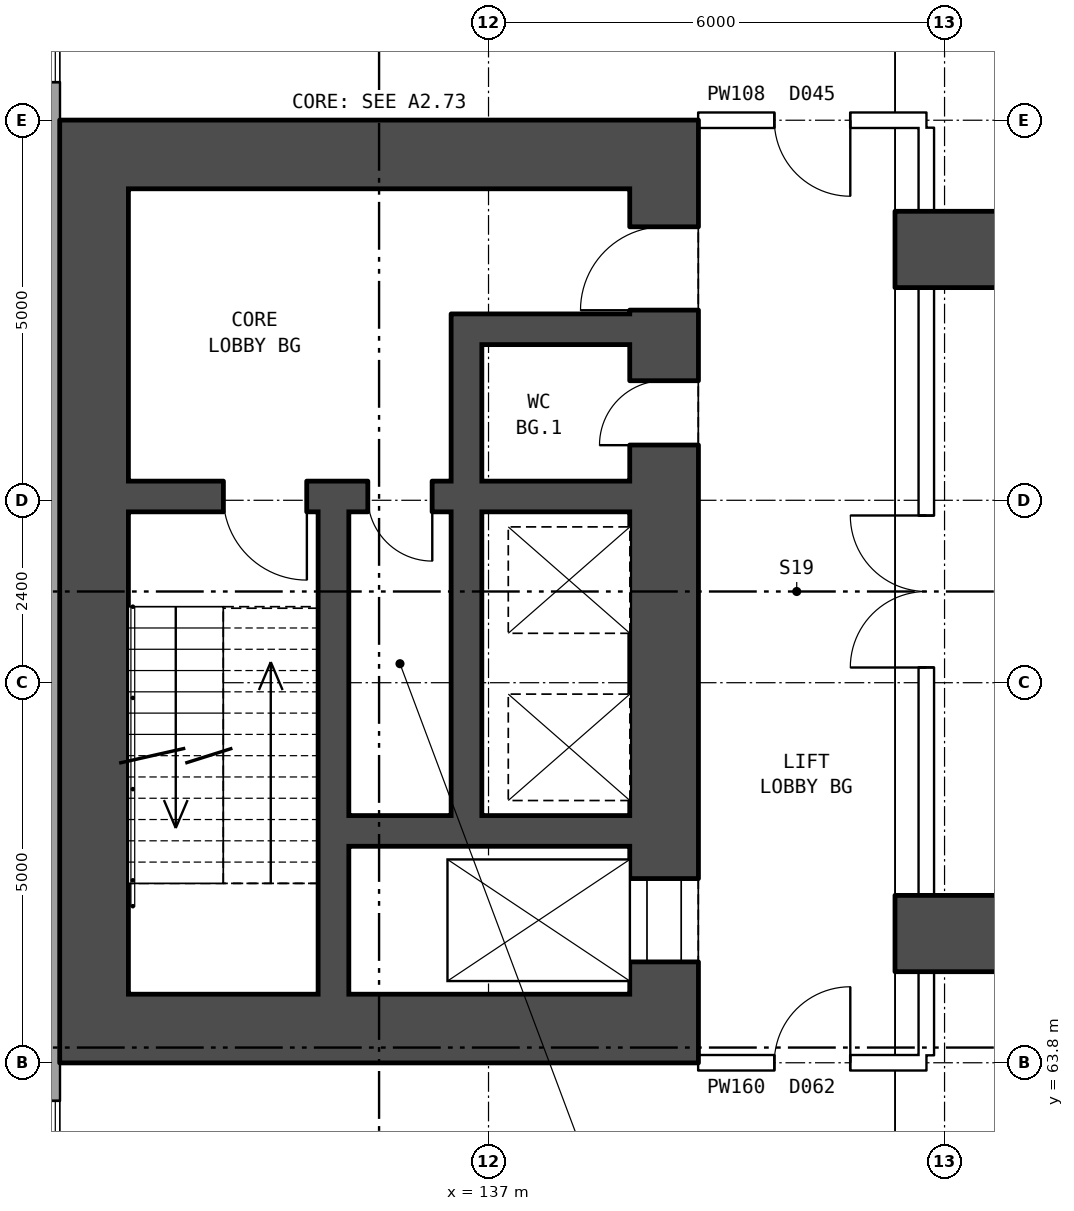
"""IFC4 building model, lengths in metres.
Left out: names, types, materials, properties, quantities, classifications, styles, units other than length and angle.
Written with IfcOpenShell. Run it as: python <this file> out.ifc"""

import sys

from ifc_helpers import new_model, si_unit, direction, frame, frame_2d, origin, place, context, subcontext, project, spatial, rectangle, extrude, element, fill, save


model = new_model("IFC4")
c1 = context("Model", 3, precision=1e-05, world=origin(), true_north=direction((0.0, 1.0)))
c2 = subcontext(c1, "Body", "Model", "MODEL_VIEW")
j1 = project(units=[si_unit("LENGTHUNIT", "METRE"), si_unit("PLANEANGLEUNIT", "RADIAN")], contexts=[c1])
p1 = place(None, origin())
s1 = spatial("IfcSite", under=j1, at=p1, CompositionType="ELEMENT")
p2 = place(p1, origin())
s2 = spatial("IfcBuilding", under=s1, at=p2, CompositionType="ELEMENT")
p3 = place(p2, frame((0.0, 0.0, 14.7)))
s3 = spatial("IfcBuildingStorey", under=s2, at=p3, CompositionType="ELEMENT", Elevation=14.7)
for number, where, z_axis, x_axis in (
    (1, (142.35, 65.5, 0.0), (0.0, 0.0, 1.0), (1.0, 0.0, 0.0)),
    (2, (142.35, 74.5, 0.0), (0.0, 0.0, 1.0), (1.0, 0.0, 0.0)),
):
    element("IfcWall", number, at=place(p3, frame(where, z_axis=z_axis, x_axis=x_axis)), inside=s3, PredefinedType="SHEAR", context=c2, shape_type="SweptSolid", body=[
        extrude(rectangle(XDim=15.3, YDim=1.0, at=frame_2d((7.65, 0.0))), origin(), (0.0, 0.0, 1.0), 4.0),
    ])
p4 = place(p3, frame((131.18, 82.925, 0.0), z_axis=(0.0, 0.0, 1.0), x_axis=(0.0, -1.0, 0.0)))
e3 = element("IfcWall", 3, at=p4, inside=s3, PredefinedType="STANDARD", context=c2, shape_type="SweptSolid", body=[
    extrude(rectangle(XDim=25.851, YDim=0.36, at=frame_2d((12.925, 0.0))), origin(), (0.0, 0.0, 1.0), 4.0),
])
p5 = place(p4, frame((1.625, 0.0, 0.8)))
e4 = element("IfcOpeningElement", 4, at=p5, cuts=e3, PredefinedType="OPENING", context=c2, shape_type="SweptSolid", body=[
    extrude(rectangle(XDim=1.6, YDim=1.8, at=frame_2d((0.8, 0.9))), frame((0.0, 0.19, 0.0), z_axis=(0.0, -1.0, 0.0), x_axis=(1.0, 0.0, 0.0)), (0.0, 0.0, 1.0), 0.38),
])
p6 = place(p4, frame((4.625, 0.0, 0.8)))
e5 = element("IfcOpeningElement", 5, at=p6, cuts=e3, PredefinedType="OPENING", context=c2, shape_type="SweptSolid", body=[
    extrude(rectangle(XDim=1.6, YDim=1.8, at=frame_2d((0.8, 0.9))), frame((0.0, 0.19, 0.0), z_axis=(0.0, -1.0, 0.0), x_axis=(1.0, 0.0, 0.0)), (0.0, 0.0, 1.0), 0.38),
])
p7 = place(p4, frame((19.625, 0.0, 0.8)))
e6 = element("IfcOpeningElement", 6, at=p7, cuts=e3, PredefinedType="OPENING", context=c2, shape_type="SweptSolid", body=[
    extrude(rectangle(XDim=1.6, YDim=1.8, at=frame_2d((0.8, 0.9))), frame((0.0, 0.19, 0.0), z_axis=(0.0, -1.0, 0.0), x_axis=(1.0, 0.0, 0.0)), (0.0, 0.0, 1.0), 0.38),
])
p8 = place(p4, frame((22.625, 0.0, 0.8)))
e7 = element("IfcOpeningElement", 7, at=p8, cuts=e3, PredefinedType="OPENING", context=c2, shape_type="SweptSolid", body=[
    extrude(rectangle(XDim=1.6, YDim=1.8, at=frame_2d((0.8, 0.9))), frame((0.0, 0.19, 0.0), z_axis=(0.0, -1.0, 0.0), x_axis=(1.0, 0.0, 0.0)), (0.0, 0.0, 1.0), 0.38),
])
p9 = place(p3, frame((139.31, 64.7, 0.0), z_axis=(0.0, 0.0, 1.0), x_axis=(0.0, 1.0, 0.0)))
e8 = element("IfcWall", 8, at=p9, inside=s3, PredefinedType="SHEAR", context=c2, shape_type="SweptSolid", body=[
    extrude(rectangle(XDim=10.6, YDim=0.9, at=frame_2d((5.3, 0.0))), origin(), (0.0, 0.0, 1.0), 4.0),
])
p10 = place(p9, frame((0.425, 0.0, 0.0)))
e9 = element("IfcOpeningElement", 9, at=p10, cuts=e8, PredefinedType="OPENING", context=c2, shape_type="SweptSolid", body=[
    extrude(rectangle(XDim=1.1, YDim=2.1, at=frame_2d((0.55, 1.05))), frame((0.0, 0.46, 0.0), z_axis=(0.0, -1.0, 0.0), x_axis=(1.0, 0.0, 0.0)), (0.0, 0.0, 1.0), 0.92),
])
p11 = place(p9, frame((9.0, 0.0, 0.0)))
e10 = element("IfcOpeningElement", 10, at=p11, cuts=e8, PredefinedType="OPENING", context=c2, shape_type="SweptSolid", body=[
    extrude(rectangle(XDim=1.1, YDim=2.1, at=frame_2d((0.55, 1.05))), frame((0.0, 0.46, 0.0), z_axis=(0.0, -1.0, 0.0), x_axis=(1.0, 0.0, 0.0)), (0.0, 0.0, 1.0), 0.92),
])
p12 = place(p9, frame((7.225, 0.0, 0.0)))
e11 = element("IfcOpeningElement", 11, at=p12, cuts=e8, PredefinedType="OPENING", context=c2, shape_type="SweptSolid", body=[
    extrude(rectangle(XDim=0.85, YDim=2.1, at=frame_2d((0.425, 1.05))), frame((0.0, 0.46, 0.0), z_axis=(0.0, -1.0, 0.0), x_axis=(1.0, 0.0, 0.0)), (0.0, 0.0, 1.0), 0.92),
])
p13 = place(p3, frame((131.81, 64.7, 0.0), z_axis=(0.0, 0.0, 1.0), x_axis=(0.0, 1.0, 0.0)))
e12 = element("IfcWall", 12, at=p13, inside=s3, PredefinedType="SHEAR", context=c2, shape_type="SweptSolid", body=[
    extrude(rectangle(XDim=10.6, YDim=0.9, at=frame_2d((5.3, 0.0))), origin(), (0.0, 0.0, 1.0), 4.0),
])
for number, where, z_axis, x_axis in (
    (13, (139.76, 64.25, 0.0), (0.0, 0.0, 1.0), (-1.0, 0.0, 0.0)),
    (14, (139.76, 75.75, 0.0), (0.0, 0.0, 1.0), (-1.0, 0.0, 0.0)),
):
    element("IfcWall", number, at=place(p3, frame(where, z_axis=z_axis, x_axis=x_axis)), inside=s3, PredefinedType="SHEAR", context=c2, shape_type="SweptSolid", body=[
        extrude(rectangle(XDim=8.4, YDim=0.9, at=frame_2d((4.2, 0.0))), origin(), (0.0, 0.0, 1.0), 4.0),
    ])
p14 = place(p3, frame((138.86, 66.85, 0.0), z_axis=(0.0, 0.0, 1.0), x_axis=(-1.0, 0.0, 0.0)))
e15 = element("IfcWall", 15, at=p14, inside=s3, PredefinedType="SHEAR", context=c2, shape_type="SweptSolid", body=[
    extrude(rectangle(XDim=3.7, YDim=0.4, at=frame_2d((1.85, 0.0))), origin(), (0.0, 0.0, 1.0), 4.0),
])
p15 = place(p3, frame((138.86, 71.25, 0.0), z_axis=(0.0, 0.0, 1.0), x_axis=(-1.0, 0.0, 0.0)))
e16 = element("IfcWall", 16, at=p15, inside=s3, PredefinedType="SHEAR", context=c2, shape_type="SweptSolid", body=[
    extrude(rectangle(XDim=6.6, YDim=0.4, at=frame_2d((3.3, 0.0))), origin(), (0.0, 0.0, 1.0), 4.0),
])
p16 = place(p15, frame((4.25, 0.0, 0.0)))
e17 = element("IfcOpeningElement", 17, at=p16, cuts=e16, PredefinedType="OPENING", context=c2, shape_type="SweptSolid", body=[
    extrude(rectangle(XDim=1.1, YDim=2.1, at=frame_2d((0.55, 1.05))), frame((0.0, 0.21, 0.0), z_axis=(0.0, -1.0, 0.0), x_axis=(1.0, 0.0, 0.0)), (0.0, 0.0, 1.0), 0.42),
])
p17 = place(p15, frame((2.6, 0.0, 0.0)))
e18 = element("IfcOpeningElement", 18, at=p17, cuts=e16, PredefinedType="OPENING", context=c2, shape_type="SweptSolid", body=[
    extrude(rectangle(XDim=0.85, YDim=2.1, at=frame_2d((0.425, 1.05))), frame((0.0, 0.21, 0.0), z_axis=(0.0, -1.0, 0.0), x_axis=(1.0, 0.0, 0.0)), (0.0, 0.0, 1.0), 0.42),
])
p18 = place(p3, frame((138.86, 73.45, 0.0), z_axis=(0.0, 0.0, 1.0), x_axis=(-1.0, 0.0, 0.0)))
e19 = element("IfcWall", 19, at=p18, inside=s3, PredefinedType="SHEAR", context=c2, shape_type="SweptSolid", body=[
    extrude(rectangle(XDim=1.95, YDim=0.4, at=frame_2d((0.975, 0.0))), origin(), (0.0, 0.0, 1.0), 4.0),
])
p19 = place(p3, frame((136.71, 67.05, 0.0), z_axis=(0.0, 0.0, 1.0), x_axis=(0.0, 1.0, 0.0)))
e20 = element("IfcWall", 20, at=p19, inside=s3, PredefinedType="SHEAR", context=c2, shape_type="SweptSolid", body=[
    extrude(rectangle(XDim=4.0, YDim=0.4, at=frame_2d((2.0, 0.0))), origin(), (0.0, 0.0, 1.0), 4.0),
])
p20 = place(p3, frame((136.71, 71.45, 0.0), z_axis=(0.0, 0.0, 1.0), x_axis=(0.0, 1.0, 0.0)))
e21 = element("IfcWall", 21, at=p20, inside=s3, PredefinedType="SHEAR", context=c2, shape_type="SweptSolid", body=[
    extrude(rectangle(XDim=2.2, YDim=0.4, at=frame_2d((1.1, 0.0))), origin(), (0.0, 0.0, 1.0), 4.0),
])
p21 = place(p3, frame((134.96, 64.7, 0.0), z_axis=(0.0, 0.0, 1.0), x_axis=(0.0, 1.0, 0.0)))
e22 = element("IfcWall", 22, at=p21, inside=s3, PredefinedType="SHEAR", context=c2, shape_type="SweptSolid", body=[
    extrude(rectangle(XDim=6.35, YDim=0.4, at=frame_2d((3.175, 0.0))), origin(), (0.0, 0.0, 1.0), 4.0),
])
p22 = place(p3, frame((142.76, 63.9, 0.0), z_axis=(0.0, 0.0, 1.0), x_axis=(0.0, 1.0, 0.0)))
e23 = element("IfcWall", 23, at=p22, inside=s3, PredefinedType="PARTITIONING", context=c2, shape_type="SweptSolid", body=[
    extrude(rectangle(XDim=12.2, YDim=0.2, at=frame_2d((6.1, 0.0))), origin(), (0.0, 0.0, 1.0), 4.0),
])
p23 = place(p22, frame((5.1, 0.0, 0.0)))
e24 = element("IfcOpeningElement", 24, at=p23, cuts=e23, PredefinedType="OPENING", context=c2, shape_type="SweptSolid", body=[
    extrude(rectangle(XDim=2.0, YDim=2.1, at=frame_2d((1.0, 1.05))), frame((0.0, 0.11, 0.0), z_axis=(0.0, -1.0, 0.0), x_axis=(1.0, 0.0, 0.0)), (0.0, 0.0, 1.0), 0.22),
])
p24 = place(p3, frame((139.76, 63.8, 0.0), z_axis=(0.0, 0.0, 1.0), x_axis=(1.0, 0.0, 0.0)))
e25 = element("IfcWall", 25, at=p24, inside=s3, PredefinedType="PARTITIONING", context=c2, shape_type="SweptSolid", body=[
    extrude(rectangle(XDim=3.0, YDim=0.2, at=frame_2d((1.5, 0.0))), origin(), (0.0, 0.0, 1.0), 4.0),
])
p25 = place(p24, frame((1.0, 0.0, 0.0)))
e26 = element("IfcOpeningElement", 26, at=p25, cuts=e25, PredefinedType="OPENING", context=c2, shape_type="SweptSolid", body=[
    extrude(rectangle(XDim=1.0, YDim=2.1, at=frame_2d((0.5, 1.05))), frame((0.0, 0.11, 0.0), z_axis=(0.0, -1.0, 0.0), x_axis=(1.0, 0.0, 0.0)), (0.0, 0.0, 1.0), 0.22),
])
p26 = place(p3, frame((139.76, 76.2, 0.0), z_axis=(0.0, 0.0, 1.0), x_axis=(1.0, 0.0, 0.0)))
e27 = element("IfcWall", 27, at=p26, inside=s3, PredefinedType="PARTITIONING", context=c2, shape_type="SweptSolid", body=[
    extrude(rectangle(XDim=3.0, YDim=0.2, at=frame_2d((1.5, 0.0))), origin(), (0.0, 0.0, 1.0), 4.0),
])
p27 = place(p26, frame((1.0, 0.0, 0.0)))
e28 = element("IfcOpeningElement", 28, at=p27, cuts=e27, PredefinedType="OPENING", context=c2, shape_type="SweptSolid", body=[
    extrude(rectangle(XDim=1.0, YDim=2.1, at=frame_2d((0.5, 1.05))), frame((0.0, 0.11, 0.0), z_axis=(0.0, -1.0, 0.0), x_axis=(1.0, 0.0, 0.0)), (0.0, 0.0, 1.0), 0.22),
])
p28 = place(p6, origin())
e29 = element("IfcWindow", 29, at=p28, inside=s3, PartitioningType="SINGLE_PANEL", PredefinedType="WINDOW", context=c2, shape_type="SweptSolid", body=[
    extrude(rectangle(XDim=1.6, YDim=1.8, at=frame_2d((0.8, 0.9))), frame((0.0, 0.15, 0.0), z_axis=(0.0, -1.0, 0.0), x_axis=(1.0, 0.0, 0.0)), (0.0, 0.0, 1.0), 0.06),
])
fill(e5, e29)
p29 = place(p7, origin())
e30 = element("IfcWindow", 30, at=p29, inside=s3, PartitioningType="SINGLE_PANEL", PredefinedType="WINDOW", context=c2, shape_type="SweptSolid", body=[
    extrude(rectangle(XDim=1.6, YDim=1.8, at=frame_2d((0.8, 0.9))), frame((0.0, 0.15, 0.0), z_axis=(0.0, -1.0, 0.0), x_axis=(1.0, 0.0, 0.0)), (0.0, 0.0, 1.0), 0.06),
])
fill(e6, e30)
p30 = place(p10, origin())
e31 = element("IfcDoor", 31, at=p30, inside=s3, OperationType="DOUBLE_DOOR_SLIDING", PredefinedType="DOOR", context=c2, shape_type="SweptSolid", body=[
    extrude(rectangle(XDim=1.1, YDim=2.1, at=frame_2d((0.55, 1.05))), frame((0.0, 0.435, 0.0), z_axis=(0.0, -1.0, 0.0), x_axis=(1.0, 0.0, 0.0)), (0.0, 0.0, 1.0), 0.05),
])
fill(e9, e31)
p31 = place(p11, origin())
e32 = element("IfcDoor", 32, at=p31, inside=s3, OperationType="SINGLE_SWING_LEFT", PredefinedType="DOOR", context=c2, shape_type="SweptSolid", body=[
    extrude(rectangle(XDim=1.1, YDim=2.1, at=frame_2d((0.55, 1.05))), frame((0.0, 0.435, 0.0), z_axis=(0.0, -1.0, 0.0), x_axis=(1.0, 0.0, 0.0)), (0.0, 0.0, 1.0), 0.05),
])
fill(e10, e32)
p32 = place(p16, origin())
e33 = element("IfcDoor", 33, at=p32, inside=s3, OperationType="SINGLE_SWING_LEFT", PredefinedType="DOOR", context=c2, shape_type="SweptSolid", body=[
    extrude(rectangle(XDim=1.1, YDim=2.1, at=frame_2d((0.55, 1.05))), frame((0.0, 0.025, 0.0), z_axis=(0.0, -1.0, 0.0), x_axis=(1.0, 0.0, 0.0)), (0.0, 0.0, 1.0), 0.05),
])
fill(e17, e33)
p33 = place(p12, origin())
e34 = element("IfcDoor", 34, at=p33, inside=s3, OperationType="SINGLE_SWING_LEFT", PredefinedType="DOOR", context=c2, shape_type="SweptSolid", body=[
    extrude(rectangle(XDim=0.85, YDim=2.1, at=frame_2d((0.425, 1.05))), frame((0.0, 0.435, 0.0), z_axis=(0.0, -1.0, 0.0), x_axis=(1.0, 0.0, 0.0)), (0.0, 0.0, 1.0), 0.05),
])
fill(e11, e34)
p34 = place(p17, origin())
e35 = element("IfcDoor", 35, at=p34, inside=s3, OperationType="SINGLE_SWING_LEFT", PredefinedType="DOOR", context=c2, shape_type="SweptSolid", body=[
    extrude(rectangle(XDim=0.85, YDim=2.1, at=frame_2d((0.425, 1.05))), frame((0.0, 0.025, 0.0), z_axis=(0.0, -1.0, 0.0), x_axis=(1.0, 0.0, 0.0)), (0.0, 0.0, 1.0), 0.05),
])
fill(e18, e35)
p35 = place(p23, origin())
e36 = element("IfcDoor", 36, at=p35, inside=s3, OperationType="DOUBLE_DOOR_SINGLE_SWING", PredefinedType="DOOR", context=c2, shape_type="SweptSolid", body=[
    extrude(rectangle(XDim=2.0, YDim=2.1, at=frame_2d((1.0, 1.05))), frame((0.0, 0.025, 0.0), z_axis=(0.0, -1.0, 0.0), x_axis=(1.0, 0.0, 0.0)), (0.0, 0.0, 1.0), 0.05),
])
fill(e24, e36)
p36 = place(p25, origin())
e37 = element("IfcDoor", 37, at=p36, inside=s3, OperationType="SINGLE_SWING_RIGHT", PredefinedType="DOOR", context=c2, shape_type="SweptSolid", body=[
    extrude(rectangle(XDim=1.0, YDim=2.1, at=frame_2d((0.5, 1.05))), frame((0.0, 0.025, 0.0), z_axis=(0.0, -1.0, 0.0), x_axis=(1.0, 0.0, 0.0)), (0.0, 0.0, 1.0), 0.05),
])
fill(e26, e37)
p37 = place(p27, frame((1.0, 0.0, 0.0), z_axis=(0.0, 0.0, 1.0), x_axis=(-1.0, 0.0, 0.0)))
e38 = element("IfcDoor", 38, at=p37, inside=s3, OperationType="SINGLE_SWING_LEFT", PredefinedType="DOOR", context=c2, shape_type="SweptSolid", body=[
    extrude(rectangle(XDim=1.0, YDim=2.1, at=frame_2d((0.5, 1.05))), frame((0.0, 0.025, 0.0), z_axis=(0.0, -1.0, 0.0), x_axis=(1.0, 0.0, 0.0)), (0.0, 0.0, 1.0), 0.05),
])
fill(e28, e38)
save(model, sys.argv[1])
